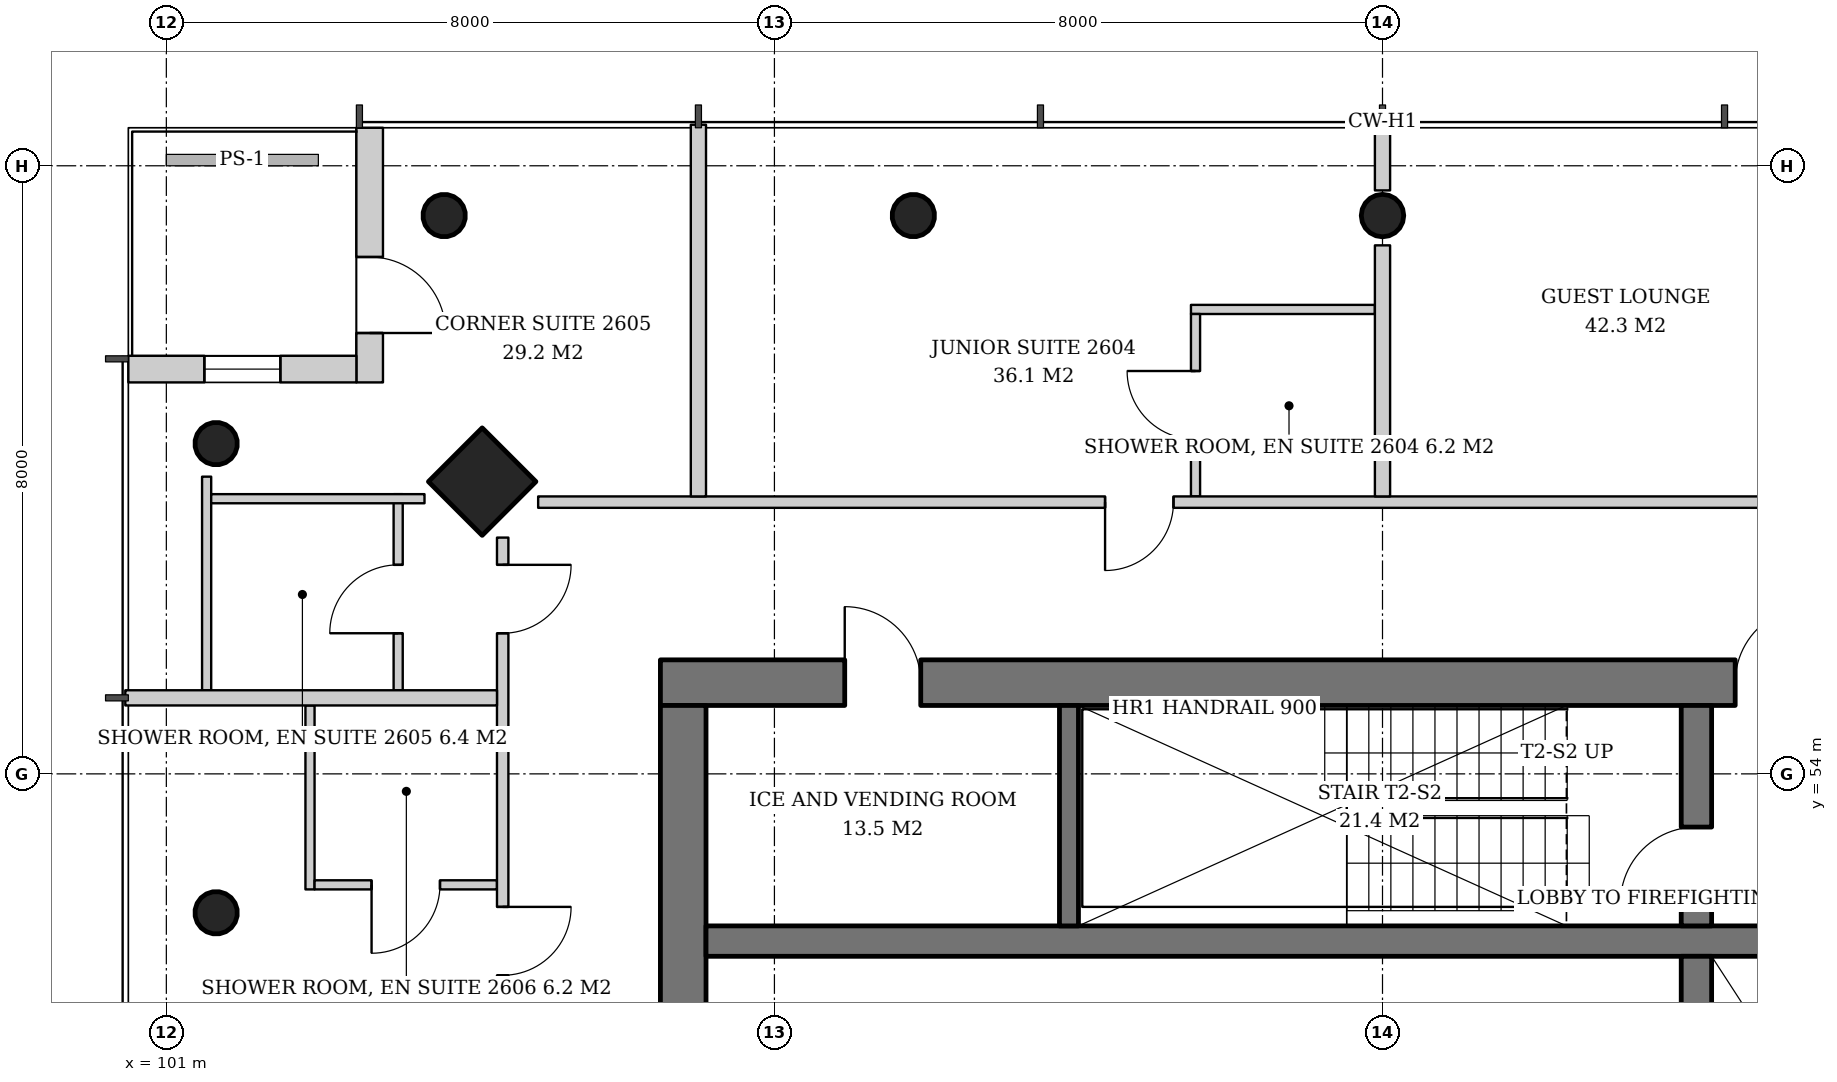
"""IFC4 building model, lengths in metres.
Left out: names, types, materials, properties, quantities, classifications, styles, units other than length and angle.
Written with IfcOpenShell. Run it as: python <this file> out.ifc"""

import sys

from ifc_helpers import new_model, si_unit, direction, frame, frame_2d, origin, origin_2d, place, context, subcontext, project, spatial, rectangle, hollow_circle, extrude, element, fill, save


model = new_model("IFC4")
c1 = context("Model", 3, precision=1e-05, world=origin(), true_north=direction((0.0, 1.0)))
c2 = subcontext(c1, "Body", "Model", "MODEL_VIEW")
j1 = project(units=[si_unit("LENGTHUNIT", "METRE"), si_unit("PLANEANGLEUNIT", "RADIAN")], contexts=[c1])
p1 = place(None, origin())
s1 = spatial("IfcSite", under=j1, at=p1, CompositionType="ELEMENT")
p2 = place(p1, origin())
s2 = spatial("IfcBuilding", under=s1, at=p2, CompositionType="ELEMENT")
p3 = place(p2, frame((0.0, 0.0, 104.6)))
s3 = spatial("IfcBuildingStorey", under=s2, at=p3, CompositionType="ELEMENT", Elevation=104.6)
p4 = place(p3, frame((105.104, 57.896, 0.0), z_axis=(0.043032401563, -0.043032401563, 0.998146494675), x_axis=(0.707106781187, 0.707106781187, 0.0)))
e1 = element("IfcColumn", 1, at=p4, inside=s3, PredefinedType="COLUMN", context=c2, shape_type="SweptSolid", body=[
    extrude(rectangle(XDim=1.0, YDim=1.0, at=origin_2d()), origin(), (0.0, 0.0, 1.0), 3.807),
])
p5 = place(p3, frame((104.604, 61.396, 0.0), z_axis=(0.043032401563, -0.043032401563, 0.998146494675), x_axis=(0.707106781187, 0.707106781187, 0.0)))
e2 = element("IfcColumn", 2, at=p5, inside=s3, PredefinedType="COLUMN", context=c2, shape_type="SweptSolid", body=[
    extrude(hollow_circle(Radius=0.28, WallThickness=0.02, at=origin_2d()), origin(), (0.0, 0.0, 1.0), 3.807),
])
p6 = place(p3, frame((117.0, 61.396, 0.0), z_axis=(0.0, -0.043072300418, 0.999071957837), x_axis=(1.0, 0.0, 0.0)))
e3 = element("IfcColumn", 3, at=p6, inside=s3, PredefinedType="COLUMN", context=c2, shape_type="SweptSolid", body=[
    extrude(hollow_circle(Radius=0.28, WallThickness=0.02, at=origin_2d()), origin(), (0.0, 0.0, 1.0), 3.803),
])
p7 = place(p3, frame((110.802, 61.396, 0.0), z_axis=(0.02149908433, -0.04306234503, 0.998841040313), x_axis=(0.894693706707, 0.446680166538, 0.0)))
e4 = element("IfcColumn", 4, at=p7, inside=s3, PredefinedType="COLUMN", context=c2, shape_type="SweptSolid", body=[
    extrude(hollow_circle(Radius=0.28, WallThickness=0.02, at=origin_2d()), origin(), (0.0, 0.0, 1.0), 3.804),
])
p8 = place(p3, frame((101.604, 58.396, 0.0), z_axis=(0.043032401563, -0.043032401563, 0.998146494675), x_axis=(0.707106781187, 0.707106781187, 0.0)))
e5 = element("IfcColumn", 5, at=p8, inside=s3, PredefinedType="COLUMN", context=c2, shape_type="SweptSolid", body=[
    extrude(hollow_circle(Radius=0.28, WallThickness=0.02, at=origin_2d()), origin(), (0.0, 0.0, 1.0), 3.807),
])
p9 = place(p3, frame((101.604, 52.198, 0.0), z_axis=(0.04306234503, -0.02149908433, 0.998841040313), x_axis=(0.446680166538, 0.894693706707, 0.0)))
e6 = element("IfcColumn", 6, at=p9, inside=s3, PredefinedType="COLUMN", context=c2, shape_type="SweptSolid", body=[
    extrude(hollow_circle(Radius=0.28, WallThickness=0.02, at=origin_2d()), origin(), (0.0, 0.0, 1.0), 3.804),
])
p10 = place(p3, frame((107.5, 55.2, 0.0), z_axis=(0.0, 0.0, 1.0), x_axis=(1.0, 0.0, 0.0)))
e7 = element("IfcWall", 7, at=p10, inside=s3, PredefinedType="SHEAR", context=c2, shape_type="SweptSolid", body=[
    extrude(rectangle(XDim=19.0, YDim=0.6, at=frame_2d((9.5, 0.0))), origin(), (0.0, 0.0, 1.0), 3.8),
])
p11 = place(p10, frame((14.14, 0.0, 0.0)))
e8 = element("IfcOpeningElement", 8, at=p11, cuts=e7, PredefinedType="OPENING", context=c2, shape_type="SweptSolid", body=[
    extrude(rectangle(XDim=1.0, YDim=2.1, at=frame_2d((0.5, 1.05))), frame((0.0, 0.31, 0.0), z_axis=(0.0, -1.0, 0.0), x_axis=(1.0, 0.0, 0.0)), (0.0, 0.0, 1.0), 0.62),
])
p12 = place(p10, frame((2.425, 0.0, 0.0)))
e9 = element("IfcOpeningElement", 9, at=p12, cuts=e7, PredefinedType="OPENING", context=c2, shape_type="SweptSolid", body=[
    extrude(rectangle(XDim=1.0, YDim=2.1, at=frame_2d((0.5, 1.05))), frame((0.0, 0.31, 0.0), z_axis=(0.0, -1.0, 0.0), x_axis=(1.0, 0.0, 0.0)), (0.0, 0.0, 1.0), 0.62),
])
p13 = place(p3, frame((107.8, 37.1, 0.0), z_axis=(0.0, 0.0, 1.0), x_axis=(0.0, 1.0, 0.0)))
e10 = element("IfcWall", 10, at=p13, inside=s3, PredefinedType="SHEAR", context=c2, shape_type="SweptSolid", body=[
    extrude(rectangle(XDim=17.8, YDim=0.6, at=frame_2d((8.9, 0.0))), origin(), (0.0, 0.0, 1.0), 3.8),
])
p14 = place(p13, frame((8.0, 0.0, 0.0)))
e11 = element("IfcOpeningElement", 11, at=p14, cuts=e10, PredefinedType="OPENING", context=c2, shape_type="SweptSolid", body=[
    extrude(rectangle(XDim=1.8, YDim=2.4, at=frame_2d((0.9, 1.2))), frame((0.0, 0.31, 0.0), z_axis=(0.0, -1.0, 0.0), x_axis=(1.0, 0.0, 0.0)), (0.0, 0.0, 1.0), 0.62),
])
p15 = place(p3, frame((108.1, 51.8, 0.0), z_axis=(0.0, 0.0, 1.0), x_axis=(1.0, 0.0, 0.0)))
e12 = element("IfcWall", 12, at=p15, inside=s3, PredefinedType="SHEAR", context=c2, shape_type="SweptSolid", body=[
    extrude(rectangle(XDim=17.8, YDim=0.4, at=frame_2d((8.9, 0.0))), origin(), (0.0, 0.0, 1.0), 3.8),
])
p16 = place(p3, frame((121.13, 40.4, 0.0), z_axis=(0.0, 0.0, 1.0), x_axis=(0.0, 1.0, 0.0)))
e13 = element("IfcWall", 13, at=p16, inside=s3, PredefinedType="SHEAR", context=c2, shape_type="SweptSolid", body=[
    extrude(rectangle(XDim=11.2, YDim=0.4, at=frame_2d((5.6, 0.0))), origin(), (0.0, 0.0, 1.0), 3.8),
])
p17 = place(p3, frame((121.13, 52.0, 0.0), z_axis=(0.0, 0.0, 1.0), x_axis=(0.0, 1.0, 0.0)))
e14 = element("IfcWall", 14, at=p17, inside=s3, PredefinedType="SHEAR", context=c2, shape_type="SweptSolid", body=[
    extrude(rectangle(XDim=2.9, YDim=0.4, at=frame_2d((1.45, 0.0))), origin(), (0.0, 0.0, 1.0), 3.8),
])
p18 = place(p17, frame((0.3, 0.0, 0.0)))
e15 = element("IfcOpeningElement", 15, at=p18, cuts=e14, PredefinedType="OPENING", context=c2, shape_type="SweptSolid", body=[
    extrude(rectangle(XDim=1.0, YDim=2.1, at=frame_2d((0.5, 1.05))), frame((0.0, 0.21, 0.0), z_axis=(0.0, -1.0, 0.0), x_axis=(1.0, 0.0, 0.0)), (0.0, 0.0, 1.0), 0.42),
])
p19 = place(p3, frame((103.675, 62.5, 0.0), z_axis=(0.0, 0.0, 1.0), x_axis=(0.0, -1.0, 0.0)))
e16 = element("IfcWall", 16, at=p19, inside=s3, PredefinedType="SOLIDWALL", context=c2, shape_type="SweptSolid", body=[
    extrude(rectangle(XDim=3.35, YDim=0.35, at=frame_2d((1.675, 0.0))), origin(), (0.0, 0.0, 1.0), 3.6),
])
p20 = place(p19, frame((1.7, 0.0, 0.0)))
e17 = element("IfcOpeningElement", 17, at=p20, cuts=e16, PredefinedType="OPENING", context=c2, shape_type="SweptSolid", body=[
    extrude(rectangle(XDim=1.0, YDim=2.4, at=frame_2d((0.5, 1.2))), frame((0.0, 0.185, 0.0), z_axis=(0.0, -1.0, 0.0), x_axis=(1.0, 0.0, 0.0)), (0.0, 0.0, 1.0), 0.37),
])
p21 = place(p3, frame((103.5, 59.325, 0.0), z_axis=(0.0, 0.0, 1.0), x_axis=(-1.0, 0.0, 0.0)))
e18 = element("IfcWall", 18, at=p21, inside=s3, PredefinedType="SOLIDWALL", context=c2, shape_type="SweptSolid", body=[
    extrude(rectangle(XDim=3.0, YDim=0.35, at=frame_2d((1.5, 0.0))), origin(), (0.0, 0.0, 1.0), 3.6),
])
p22 = place(p21, frame((1.0, 0.0, 0.9)))
e19 = element("IfcOpeningElement", 19, at=p22, cuts=e18, PredefinedType="OPENING", context=c2, shape_type="SweptSolid", body=[
    extrude(rectangle(XDim=1.0, YDim=2.4, at=frame_2d((0.5, 1.2))), frame((0.0, 0.185, 0.0), z_axis=(0.0, -1.0, 0.0), x_axis=(1.0, 0.0, 0.0)), (0.0, 0.0, 1.0), 0.37),
])
p23 = place(p3, frame((112.875, 52.0, 0.0), z_axis=(0.0, 0.0, 1.0), x_axis=(0.0, 1.0, 0.0)))
e20 = element("IfcWall", 20, at=p23, inside=s3, PredefinedType="SHEAR", context=c2, shape_type="SweptSolid", body=[
    extrude(rectangle(XDim=2.9, YDim=0.25, at=frame_2d((1.45, 0.0))), origin(), (0.0, 0.0, 1.0), 3.8),
])
p24 = place(p3, frame((116.9, 60.11, 0.0), z_axis=(0.0, 0.0, 1.0), x_axis=(-1.0, 0.0, 0.0)))
e21 = element("IfcWall", 21, at=p24, inside=s3, PredefinedType="PARTITIONING", context=c2, shape_type="SweptSolid", body=[
    extrude(rectangle(XDim=2.42, YDim=0.12, at=frame_2d((1.21, 0.0))), origin(), (0.0, 0.0, 1.0), 3.6),
])
p25 = place(p3, frame((114.54, 57.65, 0.0), z_axis=(0.0, 0.0, 1.0), x_axis=(0.0, 1.0, 0.0)))
e22 = element("IfcWall", 22, at=p25, inside=s3, PredefinedType="PARTITIONING", context=c2, shape_type="SweptSolid", body=[
    extrude(rectangle(XDim=2.4, YDim=0.12, at=frame_2d((1.2, 0.0))), origin(), (0.0, 0.0, 1.0), 3.6),
])
p26 = place(p25, frame((0.75, 0.0, 0.0)))
e23 = element("IfcOpeningElement", 23, at=p26, cuts=e22, PredefinedType="OPENING", context=c2, shape_type="SweptSolid", body=[
    extrude(rectangle(XDim=0.9, YDim=2.1, at=frame_2d((0.45, 1.05))), frame((0.0, 0.07, 0.0), z_axis=(0.0, -1.0, 0.0), x_axis=(1.0, 0.0, 0.0)), (0.0, 0.0, 1.0), 0.14),
])
p27 = place(p3, frame((128.108, 57.575, 0.0), z_axis=(0.0, 0.0, 1.0), x_axis=(-1.0, 0.0, 0.0)))
e24 = element("IfcWall", 24, at=p27, inside=s3, PredefinedType="PARTITIONING", context=c2, shape_type="SweptSolid", body=[
    extrude(rectangle(XDim=22.217, YDim=0.15, at=frame_2d((11.108, 0.0))), origin(), (0.0, 0.0, 1.0), 2.9),
])
p28 = place(p27, frame((0.358, 0.0, 0.0)))
e25 = element("IfcOpeningElement", 25, at=p28, cuts=e24, PredefinedType="OPENING", context=c2, shape_type="SweptSolid", body=[
    extrude(rectangle(XDim=0.9, YDim=2.1, at=frame_2d((0.45, 1.05))), frame((0.0, 0.085, 0.0), z_axis=(0.0, -1.0, 0.0), x_axis=(1.0, 0.0, 0.0)), (0.0, 0.0, 1.0), 0.17),
])
p29 = place(p27, frame((4.808, 0.0, 0.0)))
e26 = element("IfcOpeningElement", 26, at=p29, cuts=e24, PredefinedType="OPENING", context=c2, shape_type="SweptSolid", body=[
    extrude(rectangle(XDim=1.0, YDim=2.1, at=frame_2d((0.5, 1.05))), frame((0.0, 0.085, 0.0), z_axis=(0.0, -1.0, 0.0), x_axis=(1.0, 0.0, 0.0)), (0.0, 0.0, 1.0), 0.17),
])
p30 = place(p27, frame((13.858, 0.0, 0.0)))
e27 = element("IfcOpeningElement", 27, at=p30, cuts=e24, PredefinedType="OPENING", context=c2, shape_type="SweptSolid", body=[
    extrude(rectangle(XDim=0.9, YDim=2.1, at=frame_2d((0.45, 1.05))), frame((0.0, 0.085, 0.0), z_axis=(0.0, -1.0, 0.0), x_axis=(1.0, 0.0, 0.0)), (0.0, 0.0, 1.0), 0.17),
])
p31 = place(p3, frame((117.0, 57.65, 0.0), z_axis=(0.0, 0.0, 1.0), x_axis=(0.0, 1.0, 0.0)))
e28 = element("IfcWall", 28, at=p31, inside=s3, PredefinedType="PARTITIONING", context=c2, shape_type="SweptSolid", body=[
    extrude(rectangle(XDim=3.303, YDim=0.2, at=frame_2d((1.652, 0.0))), origin(), (0.0, 0.0, 1.0), 3.6),
])
p32 = place(p3, frame((117.0, 61.676, 0.0), z_axis=(0.0, 0.0, 1.0), x_axis=(0.0, 1.0, 0.0)))
e29 = element("IfcWall", 29, at=p32, inside=s3, PredefinedType="PARTITIONING", context=c2, shape_type="SweptSolid", body=[
    extrude(rectangle(XDim=0.864, YDim=0.2, at=frame_2d((0.432, 0.0))), origin(), (0.0, 0.0, 1.0), 3.6),
])
p33 = place(p3, frame((108.0, 57.65, 0.0), z_axis=(0.0, 0.0, 1.0), x_axis=(0.0, 1.0, 0.0)))
e30 = element("IfcWall", 30, at=p33, inside=s3, PredefinedType="PARTITIONING", context=c2, shape_type="SweptSolid", body=[
    extrude(rectangle(XDim=4.89, YDim=0.2, at=frame_2d((2.445, 0.0))), origin(), (0.0, 0.0, 1.0), 3.2),
])
p34 = place(p3, frame((104.05, 55.1, 0.0), z_axis=(0.0, 0.0, 1.0), x_axis=(0.0, 1.0, 0.0)))
e31 = element("IfcWall", 31, at=p34, inside=s3, PredefinedType="PARTITIONING", context=c2, shape_type="SweptSolid", body=[
    extrude(rectangle(XDim=2.58, YDim=0.12, at=frame_2d((1.29, 0.0))), origin(), (0.0, 0.0, 1.0), 2.9),
])
p35 = place(p34, frame((0.75, 0.0, 0.0)))
e32 = element("IfcOpeningElement", 32, at=p35, cuts=e31, PredefinedType="OPENING", context=c2, shape_type="SweptSolid", body=[
    extrude(rectangle(XDim=0.9, YDim=2.1, at=frame_2d((0.45, 1.05))), frame((0.0, 0.07, 0.0), z_axis=(0.0, -1.0, 0.0), x_axis=(1.0, 0.0, 0.0)), (0.0, 0.0, 1.0), 0.14),
])
p36 = place(p3, frame((101.53, 55.1, 0.0), z_axis=(0.0, 0.0, 1.0), x_axis=(0.0, 1.0, 0.0)))
e33 = element("IfcWall", 33, at=p36, inside=s3, PredefinedType="PARTITIONING", context=c2, shape_type="SweptSolid", body=[
    extrude(rectangle(XDim=2.81, YDim=0.12, at=frame_2d((1.405, 0.0))), origin(), (0.0, 0.0, 1.0), 3.6),
])
p37 = place(p3, frame((104.396, 57.62, 0.0), z_axis=(0.0, 0.0, 1.0), x_axis=(-1.0, 0.0, 0.0)))
e34 = element("IfcWall", 34, at=p37, inside=s3, PredefinedType="PARTITIONING", context=c2, shape_type="SweptSolid", body=[
    extrude(rectangle(XDim=2.806, YDim=0.12, at=frame_2d((1.403, 0.0))), origin(), (0.0, 0.0, 1.0), 3.2),
])
p38 = place(p3, frame((102.89, 54.9, 0.0), z_axis=(0.0, 0.0, 1.0), x_axis=(0.0, -1.0, 0.0)))
e35 = element("IfcWall", 35, at=p38, inside=s3, PredefinedType="PARTITIONING", context=c2, shape_type="SweptSolid", body=[
    extrude(rectangle(XDim=2.42, YDim=0.12, at=frame_2d((1.21, 0.0))), origin(), (0.0, 0.0, 1.0), 3.6),
])
p39 = place(p3, frame((105.35, 52.54, 0.0), z_axis=(0.0, 0.0, 1.0), x_axis=(-1.0, 0.0, 0.0)))
e36 = element("IfcWall", 36, at=p39, inside=s3, PredefinedType="PARTITIONING", context=c2, shape_type="SweptSolid", body=[
    extrude(rectangle(XDim=2.4, YDim=0.12, at=frame_2d((1.2, 0.0))), origin(), (0.0, 0.0, 1.0), 3.6),
])
p40 = place(p39, frame((0.75, 0.0, 0.0)))
e37 = element("IfcOpeningElement", 37, at=p40, cuts=e36, PredefinedType="OPENING", context=c2, shape_type="SweptSolid", body=[
    extrude(rectangle(XDim=0.9, YDim=2.1, at=frame_2d((0.45, 1.05))), frame((0.0, 0.07, 0.0), z_axis=(0.0, -1.0, 0.0), x_axis=(1.0, 0.0, 0.0)), (0.0, 0.0, 1.0), 0.14),
])
p41 = place(p3, frame((105.425, 57.108, 0.0), z_axis=(0.0, 0.0, 1.0), x_axis=(0.0, -1.0, 0.0)))
e38 = element("IfcWall", 38, at=p41, inside=s3, PredefinedType="PARTITIONING", context=c2, shape_type="SweptSolid", body=[
    extrude(rectangle(XDim=22.217, YDim=0.15, at=frame_2d((11.108, 0.0))), origin(), (0.0, 0.0, 1.0), 2.9),
])
p42 = place(p41, frame((0.358, 0.0, 0.0)))
e39 = element("IfcOpeningElement", 39, at=p42, cuts=e38, PredefinedType="OPENING", context=c2, shape_type="SweptSolid", body=[
    extrude(rectangle(XDim=0.9, YDim=2.1, at=frame_2d((0.45, 1.05))), frame((0.0, 0.085, 0.0), z_axis=(0.0, -1.0, 0.0), x_axis=(1.0, 0.0, 0.0)), (0.0, 0.0, 1.0), 0.17),
])
p43 = place(p41, frame((4.858, 0.0, 0.0)))
e40 = element("IfcOpeningElement", 40, at=p43, cuts=e38, PredefinedType="OPENING", context=c2, shape_type="SweptSolid", body=[
    extrude(rectangle(XDim=0.9, YDim=2.1, at=frame_2d((0.45, 1.05))), frame((0.0, 0.085, 0.0), z_axis=(0.0, -1.0, 0.0), x_axis=(1.0, 0.0, 0.0)), (0.0, 0.0, 1.0), 0.17),
])
p44 = place(p41, frame((12.858, 0.0, 0.0)))
e41 = element("IfcOpeningElement", 41, at=p44, cuts=e38, PredefinedType="OPENING", context=c2, shape_type="SweptSolid", body=[
    extrude(rectangle(XDim=1.0, YDim=2.1, at=frame_2d((0.5, 1.05))), frame((0.0, 0.085, 0.0), z_axis=(0.0, -1.0, 0.0), x_axis=(1.0, 0.0, 0.0)), (0.0, 0.0, 1.0), 0.17),
])
p45 = place(p41, frame((18.308, 0.0, 0.0)))
e42 = element("IfcOpeningElement", 42, at=p45, cuts=e38, PredefinedType="OPENING", context=c2, shape_type="SweptSolid", body=[
    extrude(rectangle(XDim=1.0, YDim=2.1, at=frame_2d((0.5, 1.05))), frame((0.0, 0.085, 0.0), z_axis=(0.0, -1.0, 0.0), x_axis=(1.0, 0.0, 0.0)), (0.0, 0.0, 1.0), 0.17),
])
p46 = place(p3, frame((105.35, 55.0, 0.0), z_axis=(0.0, 0.0, 1.0), x_axis=(-1.0, 0.0, 0.0)))
e43 = element("IfcWall", 43, at=p46, inside=s3, PredefinedType="PARTITIONING", context=c2, shape_type="SweptSolid", body=[
    extrude(rectangle(XDim=4.89, YDim=0.2, at=frame_2d((2.445, 0.0))), origin(), (0.0, 0.0, 1.0), 2.9),
])
p47 = place(p20, origin())
e44 = element("IfcDoor", 44, at=p47, inside=s3, OperationType="SINGLE_SWING_RIGHT", PredefinedType="DOOR", context=c2, shape_type="SweptSolid", body=[
    extrude(rectangle(XDim=1.0, YDim=2.4, at=frame_2d((0.5, 1.2))), frame((0.0, 0.025, 0.0), z_axis=(0.0, -1.0, 0.0), x_axis=(1.0, 0.0, 0.0)), (0.0, 0.0, 1.0), 0.05),
])
fill(e17, e44)
p48 = place(p22, origin())
e45 = element("IfcWindow", 45, at=p48, inside=s3, PartitioningType="SINGLE_PANEL", PredefinedType="WINDOW", context=c2, shape_type="SweptSolid", body=[
    extrude(rectangle(XDim=1.0, YDim=2.4, at=frame_2d((0.5, 1.2))), frame((0.0, 0.03, 0.0), z_axis=(0.0, -1.0, 0.0), x_axis=(1.0, 0.0, 0.0)), (0.0, 0.0, 1.0), 0.06),
])
fill(e19, e45)
p49 = place(p18, origin())
e46 = element("IfcDoor", 46, at=p49, inside=s3, OperationType="SINGLE_SWING_LEFT", PredefinedType="DOOR", context=c2, shape_type="SweptSolid", body=[
    extrude(rectangle(XDim=1.0, YDim=2.1, at=frame_2d((0.5, 1.05))), frame((0.0, 0.025, 0.0), z_axis=(0.0, -1.0, 0.0), x_axis=(1.0, 0.0, 0.0)), (0.0, 0.0, 1.0), 0.05),
])
fill(e15, e46)
p50 = place(p11, origin())
e47 = element("IfcDoor", 47, at=p50, inside=s3, OperationType="SINGLE_SWING_RIGHT", PredefinedType="DOOR", context=c2, shape_type="SweptSolid", body=[
    extrude(rectangle(XDim=1.0, YDim=2.1, at=frame_2d((0.5, 1.05))), frame((0.0, 0.025, 0.0), z_axis=(0.0, -1.0, 0.0), x_axis=(1.0, 0.0, 0.0)), (0.0, 0.0, 1.0), 0.05),
])
fill(e8, e47)
p51 = place(p12, origin())
e48 = element("IfcDoor", 48, at=p51, inside=s3, OperationType="SINGLE_SWING_LEFT", PredefinedType="DOOR", context=c2, shape_type="SweptSolid", body=[
    extrude(rectangle(XDim=1.0, YDim=2.1, at=frame_2d((0.5, 1.05))), frame((0.0, -0.24, 0.0), z_axis=(0.0, -1.0, 0.0), x_axis=(1.0, 0.0, 0.0)), (0.0, 0.0, 1.0), 0.05),
])
fill(e9, e48)
p52 = place(p26, origin())
e49 = element("IfcDoor", 49, at=p52, inside=s3, OperationType="SINGLE_SWING_RIGHT", PredefinedType="DOOR", context=c2, shape_type="SweptSolid", body=[
    extrude(rectangle(XDim=0.9, YDim=2.1, at=frame_2d((0.45, 1.05))), frame((0.0, 0.025, 0.0), z_axis=(0.0, -1.0, 0.0), x_axis=(1.0, 0.0, 0.0)), (0.0, 0.0, 1.0), 0.05),
])
fill(e23, e49)
p53 = place(p30, origin())
e50 = element("IfcDoor", 50, at=p53, inside=s3, OperationType="SINGLE_SWING_RIGHT", PredefinedType="DOOR", context=c2, shape_type="SweptSolid", body=[
    extrude(rectangle(XDim=0.9, YDim=2.1, at=frame_2d((0.45, 1.05))), frame((0.0, 0.025, 0.0), z_axis=(0.0, -1.0, 0.0), x_axis=(1.0, 0.0, 0.0)), (0.0, 0.0, 1.0), 0.05),
])
fill(e27, e50)
p54 = place(p35, origin())
e51 = element("IfcDoor", 51, at=p54, inside=s3, OperationType="SINGLE_SWING_LEFT", PredefinedType="DOOR", context=c2, shape_type="SweptSolid", body=[
    extrude(rectangle(XDim=0.9, YDim=2.1, at=frame_2d((0.45, 1.05))), frame((0.0, 0.025, 0.0), z_axis=(0.0, -1.0, 0.0), x_axis=(1.0, 0.0, 0.0)), (0.0, 0.0, 1.0), 0.05),
])
fill(e32, e51)
p55 = place(p40, origin())
e52 = element("IfcDoor", 52, at=p55, inside=s3, OperationType="SINGLE_SWING_RIGHT", PredefinedType="DOOR", context=c2, shape_type="SweptSolid", body=[
    extrude(rectangle(XDim=0.9, YDim=2.1, at=frame_2d((0.45, 1.05))), frame((0.0, 0.025, 0.0), z_axis=(0.0, -1.0, 0.0), x_axis=(1.0, 0.0, 0.0)), (0.0, 0.0, 1.0), 0.05),
])
fill(e37, e52)
p56 = place(p42, origin())
e53 = element("IfcDoor", 53, at=p56, inside=s3, OperationType="SINGLE_SWING_LEFT", PredefinedType="DOOR", context=c2, shape_type="SweptSolid", body=[
    extrude(rectangle(XDim=0.9, YDim=2.1, at=frame_2d((0.45, 1.05))), frame((0.0, 0.025, 0.0), z_axis=(0.0, -1.0, 0.0), x_axis=(1.0, 0.0, 0.0)), (0.0, 0.0, 1.0), 0.05),
])
fill(e39, e53)
p57 = place(p43, origin())
e54 = element("IfcDoor", 54, at=p57, inside=s3, OperationType="SINGLE_SWING_LEFT", PredefinedType="DOOR", context=c2, shape_type="SweptSolid", body=[
    extrude(rectangle(XDim=0.9, YDim=2.1, at=frame_2d((0.45, 1.05))), frame((0.0, 0.025, 0.0), z_axis=(0.0, -1.0, 0.0), x_axis=(1.0, 0.0, 0.0)), (0.0, 0.0, 1.0), 0.05),
])
fill(e40, e54)
save(model, sys.argv[1])
